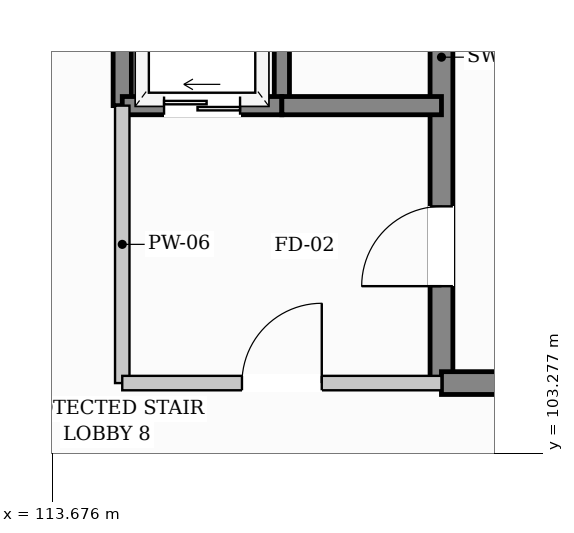
"""IFC4 building model, lengths in metres.
Left out: names, types, materials, properties, quantities, classifications, styles, units other than length and angle.
Written with IfcOpenShell. Run it as: python <this file> out.ifc"""

import sys

from ifc_helpers import new_model, si_unit, direction, frame, frame_2d, origin, place, context, subcontext, project, spatial, rectangle, extrude, element, fill, save


model = new_model("IFC4")
c1 = context("Model", 3, precision=1e-05, world=origin(), true_north=direction((0.0, 1.0)))
c2 = subcontext(c1, "Body", "Model", "MODEL_VIEW")
j1 = project(units=[si_unit("LENGTHUNIT", "METRE"), si_unit("PLANEANGLEUNIT", "RADIAN")], contexts=[c1])
p1 = place(None, origin())
s1 = spatial("IfcSite", under=j1, at=p1, CompositionType="ELEMENT")
p2 = place(p1, origin())
s2 = spatial("IfcBuilding", under=s1, at=p2, CompositionType="ELEMENT")
p3 = place(p2, frame((0.0, 0.0, 13.2)))
s3 = spatial("IfcBuildingStorey", under=s2, at=p3, CompositionType="ELEMENT", Elevation=13.2)
p4 = place(p3, frame((118.8, 104.2, 0.0), z_axis=(0.0, 0.0, 1.0), x_axis=(0.0, 1.0, 0.0)))
e1 = element("IfcWall", 1, at=p4, inside=s3, PredefinedType="SHEAR", context=c2, shape_type="SweptSolid", body=[
    extrude(rectangle(XDim=6.0, YDim=0.3, at=frame_2d((3.0, 0.0))), origin(), (0.0, 0.0, 1.0), 3.32),
])
p5 = place(p4, frame((1.275, 0.0, 0.0)))
e2 = element("IfcOpeningElement", 2, at=p5, cuts=e1, PredefinedType="OPENING", context=c2, shape_type="SweptSolid", body=[
    extrude(rectangle(XDim=1.05, YDim=2.15, at=frame_2d((0.525, 1.075))), frame((0.0, 0.16, 0.0), z_axis=(0.0, -1.0, 0.0), x_axis=(1.0, 0.0, 0.0)), (0.0, 0.0, 1.0), 0.32),
])
p6 = place(p3, frame((118.8, 104.2, 0.0), z_axis=(0.0, 0.0, 1.0), x_axis=(1.0, 0.0, 0.0)))
e3 = element("IfcWall", 3, at=p6, inside=s3, PredefinedType="SHEAR", context=c2, shape_type="SweptSolid", body=[
    extrude(rectangle(XDim=7.0, YDim=0.3, at=frame_2d((3.5, 0.0))), origin(), (0.0, 0.0, 1.0), 3.32),
])
p7 = place(p3, frame((114.6, 107.85, 0.0), z_axis=(0.0, 0.0, 1.0), x_axis=(0.0, 1.0, 0.0)))
e4 = element("IfcWall", 4, at=p7, inside=s3, PredefinedType="SHEAR", context=c2, shape_type="SweptSolid", body=[
    extrude(rectangle(XDim=2.35, YDim=0.24, at=frame_2d((1.175, 0.0))), origin(), (0.0, 0.0, 1.0), 3.32),
])
p8 = place(p3, frame((116.7, 107.85, 0.0), z_axis=(0.0, 0.0, 1.0), x_axis=(0.0, 1.0, 0.0)))
e5 = element("IfcWall", 5, at=p8, inside=s3, PredefinedType="SHEAR", context=c2, shape_type="SweptSolid", body=[
    extrude(rectangle(XDim=2.35, YDim=0.2, at=frame_2d((1.175, 0.0))), origin(), (0.0, 0.0, 1.0), 3.32),
])
p9 = place(p3, frame((114.6, 107.85, 0.0), z_axis=(0.0, 0.0, 1.0), x_axis=(1.0, 0.0, 0.0)))
e6 = element("IfcWall", 6, at=p9, inside=s3, PredefinedType="SHEAR", context=c2, shape_type="SweptSolid", body=[
    extrude(rectangle(XDim=2.1, YDim=0.24, at=frame_2d((1.05, 0.0))), origin(), (0.0, 0.0, 1.0), 3.32),
])
p10 = place(p9, frame((0.55, 0.0, 0.0)))
e7 = element("IfcOpeningElement", 7, at=p10, cuts=e6, PredefinedType="OPENING", context=c2, shape_type="SweptSolid", body=[
    extrude(rectangle(XDim=1.0, YDim=2.1, at=frame_2d((0.5, 1.05))), frame((0.0, 0.13, 0.0), z_axis=(0.0, -1.0, 0.0), x_axis=(1.0, 0.0, 0.0)), (0.0, 0.0, 1.0), 0.26),
])
p11 = place(p3, frame((116.7, 107.85, 0.0), z_axis=(0.0, 0.0, 1.0), x_axis=(1.0, 0.0, 0.0)))
e8 = element("IfcWall", 8, at=p11, inside=s3, PredefinedType="SHEAR", context=c2, shape_type="SweptSolid", body=[
    extrude(rectangle(XDim=2.1, YDim=0.24, at=frame_2d((1.05, 0.0))), origin(), (0.0, 0.0, 1.0), 3.32),
])
p12 = place(p3, frame((114.6, 104.2, 0.0), z_axis=(0.0, 0.0, 1.0), x_axis=(0.0, 1.0, 0.0)))
e9 = element("IfcWall", 9, at=p12, inside=s3, PredefinedType="PARTITIONING", context=c2, shape_type="SweptSolid", body=[
    extrude(rectangle(XDim=3.65, YDim=0.19, at=frame_2d((1.825, 0.0))), origin(), (0.0, 0.0, 1.0), 3.32),
])
p13 = place(p3, frame((114.6, 104.2, 0.0), z_axis=(0.0, 0.0, 1.0), x_axis=(1.0, 0.0, 0.0)))
e10 = element("IfcWall", 10, at=p13, inside=s3, PredefinedType="PARTITIONING", context=c2, shape_type="SweptSolid", body=[
    extrude(rectangle(XDim=4.2, YDim=0.19, at=frame_2d((2.1, 0.0))), origin(), (0.0, 0.0, 1.0), 3.32),
])
p14 = place(p13, frame((1.575, 0.0, 0.0)))
e11 = element("IfcOpeningElement", 11, at=p14, cuts=e10, PredefinedType="OPENING", context=c2, shape_type="SweptSolid", body=[
    extrude(rectangle(XDim=1.05, YDim=2.15, at=frame_2d((0.525, 1.075))), frame((0.0, 0.105, 0.0), z_axis=(0.0, -1.0, 0.0), x_axis=(1.0, 0.0, 0.0)), (0.0, 0.0, 1.0), 0.21),
])
p15 = place(p5, origin())
e12 = element("IfcDoor", 12, at=p15, inside=s3, OperationType="SINGLE_SWING_LEFT", PredefinedType="DOOR", context=c2, shape_type="SweptSolid", body=[
    extrude(rectangle(XDim=1.05, YDim=2.15, at=frame_2d((0.525, 1.075))), frame((0.0, 0.025, 0.0), z_axis=(0.0, -1.0, 0.0), x_axis=(1.0, 0.0, 0.0)), (0.0, 0.0, 1.0), 0.05),
])
fill(e2, e12)
p16 = place(p10, origin())
e13 = element("IfcDoor", 13, at=p16, inside=s3, OperationType="SLIDING_TO_LEFT", PredefinedType="DOOR", context=c2, shape_type="SweptSolid", body=[
    extrude(rectangle(XDim=1.0, YDim=2.1, at=frame_2d((0.5, 1.05))), frame((0.0, 0.025, 0.0), z_axis=(0.0, -1.0, 0.0), x_axis=(1.0, 0.0, 0.0)), (0.0, 0.0, 1.0), 0.05),
])
fill(e7, e13)
p17 = place(p14, origin())
e14 = element("IfcDoor", 14, at=p17, inside=s3, OperationType="SINGLE_SWING_RIGHT", PredefinedType="DOOR", context=c2, shape_type="SweptSolid", body=[
    extrude(rectangle(XDim=1.05, YDim=2.15, at=frame_2d((0.525, 1.075))), frame((0.0, 0.025, 0.0), z_axis=(0.0, -1.0, 0.0), x_axis=(1.0, 0.0, 0.0)), (0.0, 0.0, 1.0), 0.05),
])
fill(e11, e14)
save(model, sys.argv[1])
